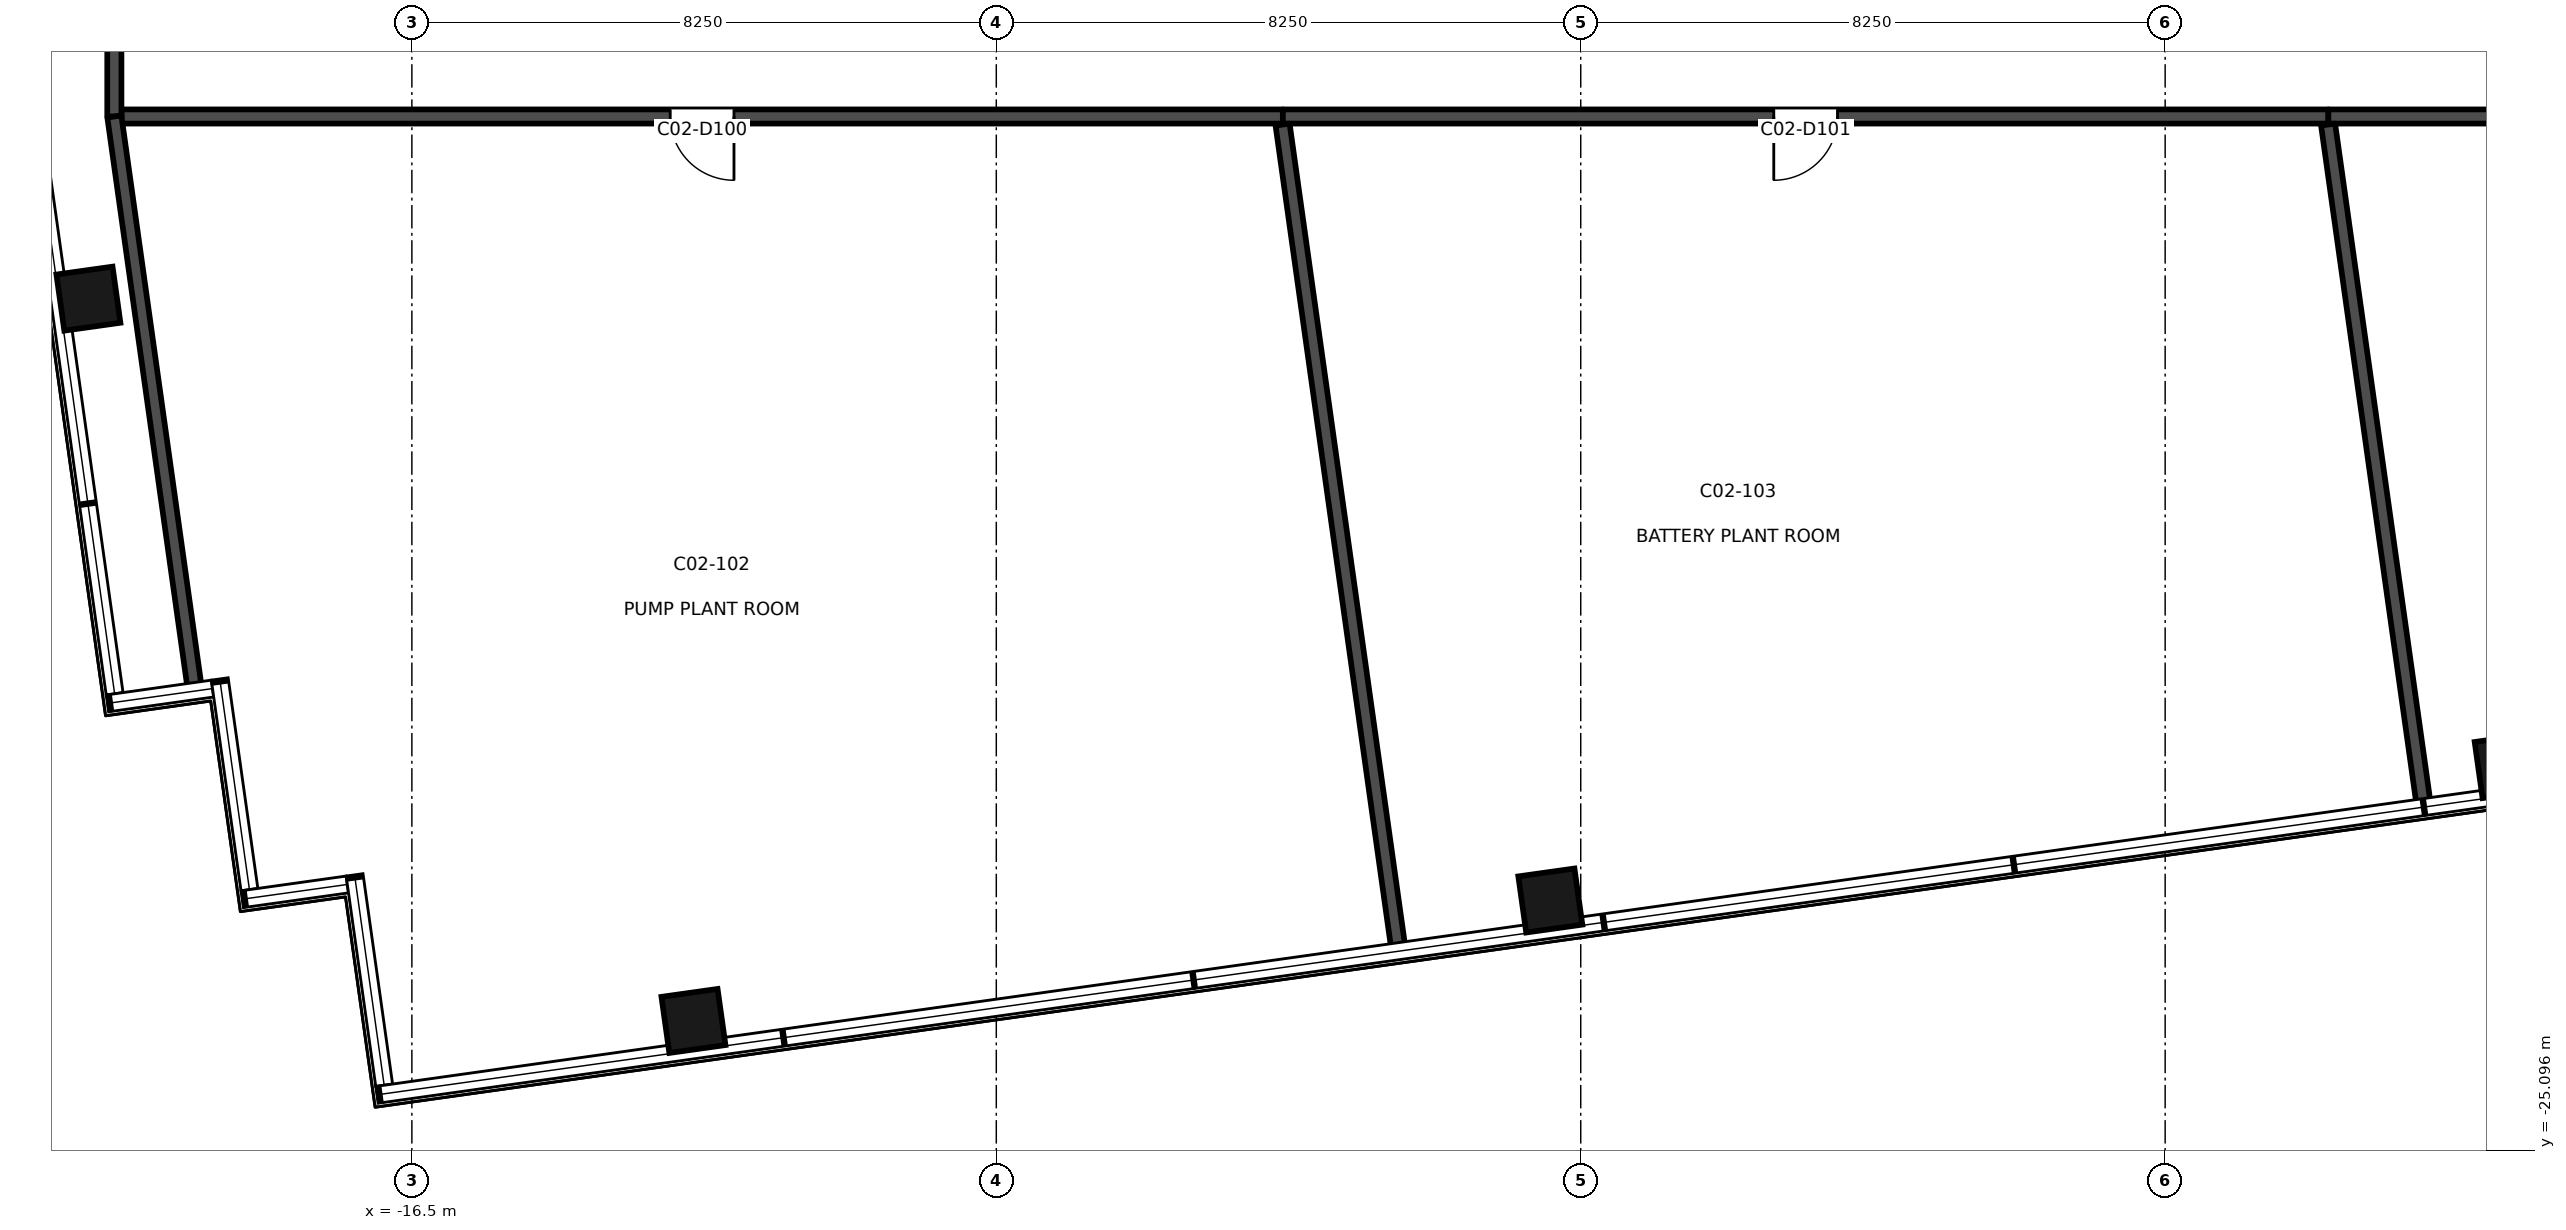
"""IFC4 building model, lengths in metres.
Left out: names, types, materials, properties, quantities, classifications, styles, units other than length and angle.
Written with IfcOpenShell. Run it as: python <this file> out.ifc"""

import sys

from ifc_helpers import new_model, si_unit, direction, frame, frame_2d, origin, origin_2d, place, context, subcontext, project, spatial, rectangle, extrude, element, fill, save


model = new_model("IFC4")
c1 = context("Model", 3, precision=1e-05, world=origin(), true_north=direction((0.0, 1.0)))
c2 = subcontext(c1, "Body", "Model", "MODEL_VIEW")
j1 = project(units=[si_unit("LENGTHUNIT", "METRE"), si_unit("PLANEANGLEUNIT", "RADIAN")], contexts=[c1])
p1 = place(None, origin())
s1 = spatial("IfcSite", under=j1, at=p1, CompositionType="ELEMENT")
p2 = place(p1, origin())
s2 = spatial("IfcBuilding", under=s1, at=p2, CompositionType="ELEMENT")
p3 = place(p2, frame((0.0, 0.0, 296.3)))
s3 = spatial("IfcBuildingStorey", under=s2, at=p3, CompositionType="ELEMENT", Elevation=296.3)
for number, where, z_axis, x_axis in (
    (1, (-12.525, -23.266, -0.2), (0.0, 0.0, 1.0), (0.99, 0.139, 0.0)),
    (2, (-0.429, -21.566, -0.2), (0.0, 0.0, 1.0), (0.99, 0.139, 0.0)),
    (3, (13.071, -19.669, -0.2), (0.0, 0.0, 1.0), (0.99, 0.139, 0.0)),
    (4, (-21.066, -13.071, -0.2), (0.0, 0.0, 1.0), (-0.139, 0.99, 0.0)),
):
    element("IfcColumn", number, at=place(p3, frame(where, z_axis=z_axis, x_axis=x_axis)), inside=s3, PredefinedType="COLUMN", context=c2, shape_type="SweptSolid", body=[
        extrude(rectangle(XDim=0.8, YDim=0.8, at=origin_2d()), origin(), (0.0, 0.0, 1.0), 4.0),
    ])
p4 = place(p3, frame((-4.205, -10.5, 0.0), z_axis=(0.0, 0.0, 1.0), x_axis=(-1.0, 0.0, 0.0)))
e5 = element("IfcWall", 5, at=p4, inside=s3, PredefinedType="PARTITIONING", context=c2, shape_type="SweptSolid", body=[
    extrude(rectangle(XDim=16.395, YDim=0.2, at=frame_2d((8.198, 0.0))), origin(), (0.0, 0.0, 1.0), 3.1),
])
p5 = place(p4, frame((7.748, 0.0, 0.0)))
e6 = element("IfcOpeningElement", 6, at=p5, cuts=e5, PredefinedType="OPENING", context=c2, shape_type="SweptSolid", body=[
    extrude(rectangle(XDim=0.9, YDim=2.1, at=frame_2d((0.45, 1.05))), frame((0.0, 0.111, 0.0), z_axis=(0.0, -1.0, 0.0), x_axis=(1.0, 0.0, 0.0)), (0.0, 0.0, 1.0), 0.221),
])
p6 = place(p3, frame((10.554, -10.5, 0.0), z_axis=(0.0, 0.0, 1.0), x_axis=(-1.0, 0.0, 0.0)))
e7 = element("IfcWall", 7, at=p6, inside=s3, PredefinedType="PARTITIONING", context=c2, shape_type="SweptSolid", body=[
    extrude(rectangle(XDim=14.759, YDim=0.2, at=frame_2d((7.379, 0.0))), origin(), (0.0, 0.0, 1.0), 3.19),
])
p7 = place(p6, frame((6.929, 0.0, 0.0)))
e8 = element("IfcOpeningElement", 8, at=p7, cuts=e7, PredefinedType="OPENING", context=c2, shape_type="SweptSolid", body=[
    extrude(rectangle(XDim=0.9, YDim=2.1, at=frame_2d((0.45, 1.05))), frame((0.0, 0.111, 0.0), z_axis=(0.0, -1.0, 0.0), x_axis=(1.0, 0.0, 0.0)), (0.0, 0.0, 1.0), 0.221),
])
p8 = place(p3, frame((20.7, -10.5, 0.0), z_axis=(0.0, 0.0, 1.0), x_axis=(-1.0, 0.0, 0.0)))
e9 = element("IfcWall", 9, at=p8, inside=s3, PredefinedType="PARTITIONING", context=c2, shape_type="SweptSolid", body=[
    extrude(rectangle(XDim=10.146, YDim=0.2, at=frame_2d((5.073, 0.0))), origin(), (0.0, 0.0, 1.0), 3.2),
])
p9 = place(p8, frame((4.623, 0.0, 0.0)))
e10 = element("IfcOpeningElement", 10, at=p9, cuts=e9, PredefinedType="OPENING", context=c2, shape_type="SweptSolid", body=[
    extrude(rectangle(XDim=0.9, YDim=2.1, at=frame_2d((0.45, 1.05))), frame((0.0, 0.111, 0.0), z_axis=(0.0, -1.0, 0.0), x_axis=(1.0, 0.0, 0.0)), (0.0, 0.0, 1.0), 0.221),
])
p10 = place(p3, frame((-20.7, -10.5, 0.0), z_axis=(0.0, 0.0, 1.0), x_axis=(0.0, 1.0, 0.0)))
e11 = element("IfcWall", 11, at=p10, inside=s3, PredefinedType="PARTITIONING", context=c2, shape_type="SweptSolid", body=[
    extrude(rectangle(XDim=18.0, YDim=0.2, at=frame_2d((9.0, 0.0))), origin(), (0.0, 0.0, 1.0), 3.5),
])
p11 = place(p10, frame((8.55, 0.0, 0.0)))
e12 = element("IfcOpeningElement", 12, at=p11, cuts=e11, PredefinedType="OPENING", context=c2, shape_type="SweptSolid", body=[
    extrude(rectangle(XDim=0.9, YDim=2.1, at=frame_2d((0.45, 1.05))), frame((0.0, 0.111, 0.0), z_axis=(0.0, -1.0, 0.0), x_axis=(1.0, 0.0, 0.0)), (0.0, 0.0, 1.0), 0.221),
])
p12 = place(p3, frame((-4.209, -10.614, 0.0), z_axis=(0.0, 0.0, 1.0), x_axis=(0.139166837679, -0.990268948968, 0.0)))
e13 = element("IfcWall", 13, at=p12, inside=s3, PredefinedType="PARTITIONING", context=c2, shape_type="SweptSolid", body=[
    extrude(rectangle(XDim=11.691, YDim=0.2, at=frame_2d((5.845, 0.0))), origin(), (0.0, 0.0, 1.0), 3.8),
])
p13 = place(p3, frame((-19.573, -18.52, 0.0), z_axis=(0.0, 0.0, 1.0), x_axis=(-0.13915044451, 0.990271252634, 0.0)))
e14 = element("IfcWall", 14, at=p13, inside=s3, PredefinedType="PARTITIONING", context=c2, shape_type="SweptSolid", body=[
    extrude(rectangle(XDim=8.099, YDim=0.2, at=frame_2d((4.049, 0.0))), origin(), (0.0, 0.0, 1.0), 3.8),
])
p14 = place(p3, frame((10.55, -10.614, 0.0), z_axis=(0.0, 0.0, 1.0), x_axis=(0.139161669219, -0.990269675301, 0.0)))
e15 = element("IfcWall", 15, at=p14, inside=s3, PredefinedType="PARTITIONING", context=c2, shape_type="SweptSolid", body=[
    extrude(rectangle(XDim=9.637, YDim=0.2, at=frame_2d((4.818, 0.0))), origin(), (0.0, 0.0, 1.0), 3.8),
])
p15 = place(p5, origin())
e16 = element("IfcDoor", 16, at=p15, inside=s3, OperationType="SINGLE_SWING_LEFT", PredefinedType="DOOR", context=c2, shape_type="SweptSolid", body=[
    extrude(rectangle(XDim=0.9, YDim=2.1, at=frame_2d((0.45, 1.05))), frame((0.0, 0.025, 0.0), z_axis=(0.0, -1.0, 0.0), x_axis=(1.0, 0.0, 0.0)), (0.0, 0.0, 1.0), 0.05),
])
fill(e6, e16)
p16 = place(p7, origin())
e17 = element("IfcDoor", 17, at=p16, inside=s3, OperationType="SINGLE_SWING_RIGHT", PredefinedType="DOOR", context=c2, shape_type="SweptSolid", body=[
    extrude(rectangle(XDim=0.9, YDim=2.1, at=frame_2d((0.45, 1.05))), frame((0.0, 0.025, 0.0), z_axis=(0.0, -1.0, 0.0), x_axis=(1.0, 0.0, 0.0)), (0.0, 0.0, 1.0), 0.05),
])
fill(e8, e17)
save(model, sys.argv[1])
